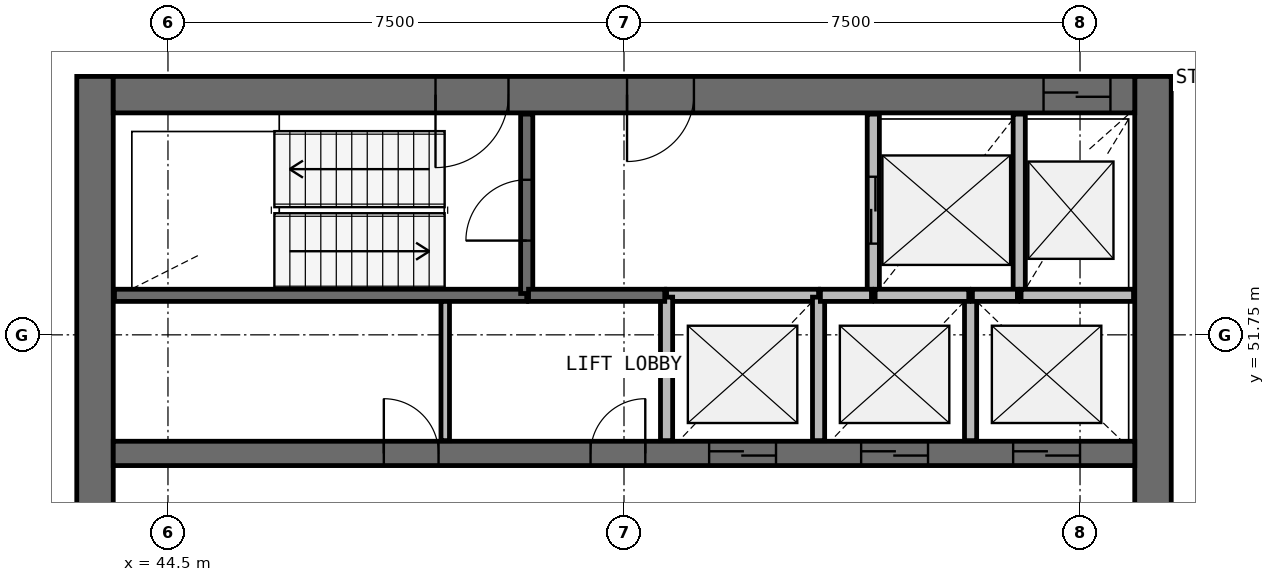
"""IFC4 building model, lengths in metres.
Left out: names, types, materials, properties, quantities, classifications, styles, units other than length and angle.
Written with IfcOpenShell. Run it as: python <this file> out.ifc"""

import sys

from ifc_helpers import new_model, si_unit, direction, frame, frame_2d, origin, place, context, subcontext, project, spatial, rectangle, extrude, source, transform, mapped, element, fill, save


model = new_model("IFC4")
c1 = context("Model", 3, precision=1e-05, world=origin(), true_north=direction((0.0, 1.0)))
c2 = subcontext(c1, "Body", "Model", "MODEL_VIEW")
j1 = project(units=[si_unit("LENGTHUNIT", "METRE"), si_unit("PLANEANGLEUNIT", "RADIAN")], contexts=[c1])
p1 = place(None, origin())
s1 = spatial("IfcSite", under=j1, at=p1, CompositionType="ELEMENT")
p2 = place(p1, origin())
s2 = spatial("IfcBuilding", under=s1, at=p2, CompositionType="ELEMENT")
p3 = place(p2, frame((0.0, 0.0, 187.7)))
s3 = spatial("IfcBuildingStorey", under=s2, at=p3, CompositionType="ELEMENT", Elevation=187.7)
p4 = place(p3, frame((60.7, 40.0, 0.0), z_axis=(0.0, 0.0, 1.0), x_axis=(0.0, 1.0, 0.0)))
e1 = element("IfcWall", 1, at=p4, inside=s3, PredefinedType="SHEAR", context=c2, shape_type="SweptSolid", body=[
    extrude(rectangle(XDim=16.0, YDim=0.6, at=frame_2d((8.0, 0.0))), origin(), (0.0, 0.0, 1.0), 3.9),
])
p5 = place(p4, frame((7.1, 0.0, 0.0)))
e2 = element("IfcOpeningElement", 2, at=p5, cuts=e1, PredefinedType="OPENING", context=c2, shape_type="SweptSolid", body=[
    extrude(rectangle(XDim=1.8, YDim=2.1, at=frame_2d((0.9, 1.05))), frame((0.0, 0.31, 0.0), z_axis=(0.0, -1.0, 0.0), x_axis=(1.0, 0.0, 0.0)), (0.0, 0.0, 1.0), 0.62),
])
p6 = place(p3, frame((43.3, 56.0, 0.0), z_axis=(0.0, 0.0, 1.0), x_axis=(0.0, -1.0, 0.0)))
e3 = element("IfcWall", 3, at=p6, inside=s3, PredefinedType="SHEAR", context=c2, shape_type="SweptSolid", body=[
    extrude(rectangle(XDim=16.0, YDim=0.6, at=frame_2d((8.0, 0.0))), origin(), (0.0, 0.0, 1.0), 3.9),
])
p7 = place(p6, frame((7.1, 0.0, 0.0)))
e4 = element("IfcOpeningElement", 4, at=p7, cuts=e3, PredefinedType="OPENING", context=c2, shape_type="SweptSolid", body=[
    extrude(rectangle(XDim=1.8, YDim=2.1, at=frame_2d((0.9, 1.05))), frame((0.0, 0.31, 0.0), z_axis=(0.0, -1.0, 0.0), x_axis=(1.0, 0.0, 0.0)), (0.0, 0.0, 1.0), 0.62),
])
p8 = place(p3, frame((60.4, 55.7, 0.0), z_axis=(0.0, 0.0, 1.0), x_axis=(-1.0, 0.0, 0.0)))
e5 = element("IfcWall", 5, at=p8, inside=s3, PredefinedType="SHEAR", context=c2, shape_type="SweptSolid", body=[
    extrude(rectangle(XDim=16.8, YDim=0.6, at=frame_2d((8.4, 0.0))), origin(), (0.0, 0.0, 1.0), 3.9),
])
p9 = place(p8, frame((0.4, 0.0, 0.0)))
e6 = element("IfcOpeningElement", 6, at=p9, cuts=e5, PredefinedType="OPENING", context=c2, shape_type="SweptSolid", body=[
    extrude(rectangle(XDim=1.1, YDim=2.1, at=frame_2d((0.55, 1.05))), frame((0.0, 0.31, 0.0), z_axis=(0.0, -1.0, 0.0), x_axis=(1.0, 0.0, 0.0)), (0.0, 0.0, 1.0), 0.62),
])
p10 = place(p8, frame((10.3, 0.0, 0.0)))
e7 = element("IfcOpeningElement", 7, at=p10, cuts=e5, PredefinedType="OPENING", context=c2, shape_type="SweptSolid", body=[
    extrude(rectangle(XDim=1.2, YDim=2.1, at=frame_2d((0.6, 1.05))), frame((0.0, 0.31, 0.0), z_axis=(0.0, -1.0, 0.0), x_axis=(1.0, 0.0, 0.0)), (0.0, 0.0, 1.0), 0.62),
])
p11 = place(p8, frame((7.25, 0.0, 0.0)))
e8 = element("IfcOpeningElement", 8, at=p11, cuts=e5, PredefinedType="OPENING", context=c2, shape_type="SweptSolid", body=[
    extrude(rectangle(XDim=1.1, YDim=2.1, at=frame_2d((0.55, 1.05))), frame((0.0, 0.31, 0.0), z_axis=(0.0, -1.0, 0.0), x_axis=(1.0, 0.0, 0.0)), (0.0, 0.0, 1.0), 0.62),
])
p12 = place(p3, frame((43.6, 49.8, 0.0), z_axis=(0.0, 0.0, 1.0), x_axis=(1.0, 0.0, 0.0)))
e9 = element("IfcWall", 9, at=p12, inside=s3, PredefinedType="SHEAR", context=c2, shape_type="SweptSolid", body=[
    extrude(rectangle(XDim=16.8, YDim=0.4, at=frame_2d((8.4, 0.0))), origin(), (0.0, 0.0, 1.0), 3.9),
])
p13 = place(p12, frame((9.8, 0.0, 0.0)))
e10 = element("IfcOpeningElement", 10, at=p13, cuts=e9, PredefinedType="OPENING", context=c2, shape_type="SweptSolid", body=[
    extrude(rectangle(XDim=1.1, YDim=2.1, at=frame_2d((0.55, 1.05))), frame((0.0, 0.21, 0.0), z_axis=(0.0, -1.0, 0.0), x_axis=(1.0, 0.0, 0.0)), (0.0, 0.0, 1.0), 0.42),
])
p14 = place(p12, frame((12.3, 0.0, 0.0)))
e11 = element("IfcOpeningElement", 11, at=p14, cuts=e9, PredefinedType="OPENING", context=c2, shape_type="SweptSolid", body=[
    extrude(rectangle(XDim=1.1, YDim=2.1, at=frame_2d((0.55, 1.05))), frame((0.0, 0.21, 0.0), z_axis=(0.0, -1.0, 0.0), x_axis=(1.0, 0.0, 0.0)), (0.0, 0.0, 1.0), 0.42),
])
p15 = place(p12, frame((14.8, 0.0, 0.0)))
e12 = element("IfcOpeningElement", 12, at=p15, cuts=e9, PredefinedType="OPENING", context=c2, shape_type="SweptSolid", body=[
    extrude(rectangle(XDim=1.1, YDim=2.1, at=frame_2d((0.55, 1.05))), frame((0.0, 0.21, 0.0), z_axis=(0.0, -1.0, 0.0), x_axis=(1.0, 0.0, 0.0)), (0.0, 0.0, 1.0), 0.42),
])
p16 = place(p12, frame((4.45, 0.0, 0.0)))
e13 = element("IfcOpeningElement", 13, at=p16, cuts=e9, PredefinedType="OPENING", context=c2, shape_type="SweptSolid", body=[
    extrude(rectangle(XDim=0.9, YDim=2.1, at=frame_2d((0.45, 1.05))), frame((0.0, 0.21, 0.0), z_axis=(0.0, -1.0, 0.0), x_axis=(1.0, 0.0, 0.0)), (0.0, 0.0, 1.0), 0.42),
])
p17 = place(p12, frame((7.85, 0.0, 0.0)))
e14 = element("IfcOpeningElement", 14, at=p17, cuts=e9, PredefinedType="OPENING", context=c2, shape_type="SweptSolid", body=[
    extrude(rectangle(XDim=0.9, YDim=2.1, at=frame_2d((0.45, 1.05))), frame((0.0, 0.21, 0.0), z_axis=(0.0, -1.0, 0.0), x_axis=(1.0, 0.0, 0.0)), (0.0, 0.0, 1.0), 0.42),
])
p18 = place(p3, frame((43.62, 52.4, 0.0), z_axis=(0.0, 0.0, 1.0), x_axis=(1.0, 0.0, 0.0)))
e15 = element("IfcWall", 15, at=p18, inside=s3, PredefinedType="SOLIDWALL", context=c2, shape_type="SweptSolid", body=[
    extrude(rectangle(XDim=6.78, YDim=0.2, at=frame_2d((3.39, 0.0))), origin(), (0.0, 0.0, 1.0), 3.58),
])
p19 = place(p3, frame((50.4, 52.43, 0.0), z_axis=(0.0, 0.0, 1.0), x_axis=(0.0, 1.0, 0.0)))
e16 = element("IfcWall", 16, at=p19, inside=s3, PredefinedType="SOLIDWALL", context=c2, shape_type="SweptSolid", body=[
    extrude(rectangle(XDim=2.95, YDim=0.2, at=frame_2d((1.475, 0.0))), origin(), (0.0, 0.0, 1.0), 3.58),
])
p20 = place(p19, frame((0.87, 0.0, 0.0)))
e17 = element("IfcOpeningElement", 17, at=p20, cuts=e16, PredefinedType="OPENING", context=c2, shape_type="SweptSolid", body=[
    extrude(rectangle(XDim=1.0, YDim=2.1, at=frame_2d((0.5, 1.05))), frame((0.0, 0.11, 0.0), z_axis=(0.0, -1.0, 0.0), x_axis=(1.0, 0.0, 0.0)), (0.0, 0.0, 1.0), 0.22),
])
p21 = place(p3, frame((56.1, 55.38, 0.0), z_axis=(0.0, 0.0, 1.0), x_axis=(0.0, -1.0, 0.0)))
e18 = element("IfcWall", 18, at=p21, inside=s3, PredefinedType="SOLIDWALL", context=c2, shape_type="SweptSolid", body=[
    extrude(rectangle(XDim=2.98, YDim=0.2, at=frame_2d((1.49, 0.0))), origin(), (0.0, 0.0, 1.0), 3.58),
])
p22 = place(p21, frame((1.03, 0.0, 0.0)))
e19 = element("IfcOpeningElement", 19, at=p22, cuts=e18, PredefinedType="OPENING", context=c2, shape_type="SweptSolid", body=[
    extrude(rectangle(XDim=1.1, YDim=2.1, at=frame_2d((0.55, 1.05))), frame((0.0, 0.11, 0.0), z_axis=(0.0, -1.0, 0.0), x_axis=(1.0, 0.0, 0.0)), (0.0, 0.0, 1.0), 0.22),
])
p23 = place(p3, frame((58.5, 52.4, 0.0), z_axis=(0.0, 0.0, 1.0), x_axis=(0.0, 1.0, 0.0)))
e20 = element("IfcWall", 20, at=p23, inside=s3, PredefinedType="SOLIDWALL", context=c2, shape_type="SweptSolid", body=[
    extrude(rectangle(XDim=2.98, YDim=0.2, at=frame_2d((1.49, 0.0))), origin(), (0.0, 0.0, 1.0), 3.58),
])
p24 = place(p3, frame((55.2, 52.4, 0.0), z_axis=(0.0, 0.0, 1.0), x_axis=(-1.0, 0.0, 0.0)))
e21 = element("IfcWall", 21, at=p24, inside=s3, PredefinedType="SOLIDWALL", context=c2, shape_type="SweptSolid", body=[
    extrude(rectangle(XDim=2.5, YDim=0.2, at=frame_2d((1.25, 0.0))), origin(), (0.0, 0.0, 1.0), 3.58),
])
for number, where, z_axis, x_axis in (
    (22, (52.7, 52.37, 0.0), (0.0, 0.0, 1.0), (0.0, -1.0, 0.0)),
    (23, (55.2, 50.01, 0.0), (0.0, 0.0, 1.0), (0.0, 1.0, 0.0)),
):
    element("IfcWall", number, at=place(p3, frame(where, z_axis=z_axis, x_axis=x_axis)), inside=s3, PredefinedType="SOLIDWALL", context=c2, shape_type="SweptSolid", body=[
        extrude(rectangle(XDim=2.36, YDim=0.2, at=frame_2d((1.18, 0.0))), origin(), (0.0, 0.0, 1.0), 3.58),
    ])
p25 = place(p3, frame((57.7, 50.01, 0.0), z_axis=(0.0, 0.0, 1.0), x_axis=(0.0, 1.0, 0.0)))
e24 = element("IfcWall", 24, at=p25, inside=s3, PredefinedType="SOLIDWALL", context=c2, shape_type="SweptSolid", body=[
    extrude(rectangle(XDim=2.39, YDim=0.2, at=frame_2d((1.195, 0.0))), origin(), (0.0, 0.0, 1.0), 3.58),
])
p26 = place(p3, frame((50.43, 52.4, 0.0), z_axis=(0.0, 0.0, 1.0), x_axis=(1.0, 0.0, 0.0)))
e25 = element("IfcWall", 25, at=p26, inside=s3, PredefinedType="SOLIDWALL", context=c2, shape_type="SweptSolid", body=[
    extrude(rectangle(XDim=2.24, YDim=0.2, at=frame_2d((1.12, 0.0))), origin(), (0.0, 0.0, 1.0), 3.58),
])
p27 = place(p3, frame((60.38, 52.4, 0.0), z_axis=(0.0, 0.0, 1.0), x_axis=(-1.0, 0.0, 0.0)))
e26 = element("IfcWall", 26, at=p27, inside=s3, PredefinedType="SOLIDWALL", context=c2, shape_type="SweptSolid", body=[
    extrude(rectangle(XDim=1.85, YDim=0.2, at=frame_2d((0.925, 0.0))), origin(), (0.0, 0.0, 1.0), 3.58),
])
p28 = place(p3, frame((57.67, 52.4, 0.0), z_axis=(0.0, 0.0, 1.0), x_axis=(-1.0, 0.0, 0.0)))
e27 = element("IfcWall", 27, at=p28, inside=s3, PredefinedType="SOLIDWALL", context=c2, shape_type="SweptSolid", body=[
    extrude(rectangle(XDim=1.54, YDim=0.2, at=frame_2d((0.77, 0.0))), origin(), (0.0, 0.0, 1.0), 3.58),
])
p29 = place(p3, frame((56.07, 52.4, 0.0), z_axis=(0.0, 0.0, 1.0), x_axis=(-1.0, 0.0, 0.0)))
e28 = element("IfcWall", 28, at=p29, inside=s3, PredefinedType="SOLIDWALL", context=c2, shape_type="SweptSolid", body=[
    extrude(rectangle(XDim=0.84, YDim=0.2, at=frame_2d((0.42, 0.0))), origin(), (0.0, 0.0, 1.0), 3.58),
])
p30 = place(p3, frame((58.47, 52.4, 0.0), z_axis=(0.0, 0.0, 1.0), x_axis=(-1.0, 0.0, 0.0)))
e29 = element("IfcWall", 29, at=p30, inside=s3, PredefinedType="SOLIDWALL", context=c2, shape_type="SweptSolid", body=[
    extrude(rectangle(XDim=0.74, YDim=0.2, at=frame_2d((0.37, 0.0))), origin(), (0.0, 0.0, 1.0), 3.58),
])
p31 = place(p3, frame((49.06, 50.01, 0.0), z_axis=(0.0, 0.0, 1.0), x_axis=(0.0, 1.0, 0.0)))
e30 = element("IfcWall", 30, at=p31, inside=s3, PredefinedType="PARTITIONING", context=c2, shape_type="SweptSolid", body=[
    extrude(rectangle(XDim=2.29, YDim=0.14, at=frame_2d((1.145, 0.0))), origin(), (0.0, 0.0, 1.0), 2.88),
])
m1 = source(origin(), c2, "Body", "SweptSolid", [
    extrude(rectangle(XDim=1.1, YDim=2.1, at=frame_2d((0.55, 1.05))), frame((0.0, 0.025, 0.0), z_axis=(0.0, -1.0, 0.0), x_axis=(1.0, 0.0, 0.0)), (0.0, 0.0, 1.0), 0.05),
])
p32 = place(p13, origin())
e31 = element("IfcDoor", 31, at=p32, inside=s3, OperationType="DOUBLE_DOOR_SLIDING", PredefinedType="USERDEFINED", context=c2, shape_type="MappedRepresentation", body=[
    mapped(m1, transform((0.0, 0.0, 0.0), scale=1.0)),
])
fill(e10, e31)
p33 = place(p14, origin())
e32 = element("IfcDoor", 32, at=p33, inside=s3, OperationType="DOUBLE_DOOR_SLIDING", PredefinedType="USERDEFINED", context=c2, shape_type="MappedRepresentation", body=[
    mapped(m1, transform((0.0, 0.0, 0.0), scale=1.0)),
])
fill(e11, e32)
p34 = place(p15, origin())
e33 = element("IfcDoor", 33, at=p34, inside=s3, OperationType="DOUBLE_DOOR_SLIDING", PredefinedType="USERDEFINED", context=c2, shape_type="MappedRepresentation", body=[
    mapped(m1, transform((0.0, 0.0, 0.0), scale=1.0)),
])
fill(e12, e33)
p35 = place(p22, origin())
e34 = element("IfcDoor", 34, at=p35, inside=s3, OperationType="DOUBLE_DOOR_SLIDING", PredefinedType="USERDEFINED", context=c2, shape_type="MappedRepresentation", body=[
    mapped(m1, transform((0.0, 0.0, 0.0), scale=1.0)),
])
fill(e19, e34)
p36 = place(p9, origin())
e35 = element("IfcDoor", 35, at=p36, inside=s3, OperationType="DOUBLE_DOOR_SLIDING", PredefinedType="USERDEFINED", context=c2, shape_type="MappedRepresentation", body=[
    mapped(m1, transform((0.0, 0.0, 0.0), scale=1.0)),
])
fill(e6, e35)
m2 = source(origin(), c2, "Body", "SweptSolid", [
    extrude(rectangle(XDim=1.2, YDim=2.1, at=frame_2d((0.6, 1.05))), frame((0.0, 0.025, 0.0), z_axis=(0.0, -1.0, 0.0), x_axis=(1.0, 0.0, 0.0)), (0.0, 0.0, 1.0), 0.05),
])
p37 = place(p10, origin())
e36 = element("IfcDoor", 36, at=p37, inside=s3, OperationType="SINGLE_SWING_RIGHT", PredefinedType="DOOR", context=c2, shape_type="MappedRepresentation", body=[
    mapped(m2, transform((0.0, 0.0, 0.0), scale=1.0)),
])
fill(e7, e36)
m3 = source(origin(), c2, "Body", "SweptSolid", [
    extrude(rectangle(XDim=1.0, YDim=2.1, at=frame_2d((0.5, 1.05))), frame((0.0, 0.025, 0.0), z_axis=(0.0, -1.0, 0.0), x_axis=(1.0, 0.0, 0.0)), (0.0, 0.0, 1.0), 0.05),
])
p38 = place(p20, origin())
e37 = element("IfcDoor", 37, at=p38, inside=s3, OperationType="SINGLE_SWING_LEFT", PredefinedType="DOOR", context=c2, shape_type="MappedRepresentation", body=[
    mapped(m3, transform((0.0, 0.0, 0.0), scale=1.0)),
])
fill(e17, e37)
m4 = source(origin(), c2, "Body", "SweptSolid", [
    extrude(rectangle(XDim=1.1, YDim=2.1, at=frame_2d((0.55, 1.05))), frame((0.0, 0.025, 0.0), z_axis=(0.0, -1.0, 0.0), x_axis=(1.0, 0.0, 0.0)), (0.0, 0.0, 1.0), 0.05),
])
p39 = place(p11, origin())
e38 = element("IfcDoor", 38, at=p39, inside=s3, OperationType="SINGLE_SWING_RIGHT", PredefinedType="DOOR", context=c2, shape_type="MappedRepresentation", body=[
    mapped(m4, transform((0.0, 0.0, 0.0), scale=1.0)),
])
fill(e8, e38)
m5 = source(origin(), c2, "Body", "SweptSolid", [
    extrude(rectangle(XDim=0.9, YDim=2.1, at=frame_2d((0.45, 1.05))), frame((0.0, 0.025, 0.0), z_axis=(0.0, -1.0, 0.0), x_axis=(1.0, 0.0, 0.0)), (0.0, 0.0, 1.0), 0.05),
])
p40 = place(p16, origin())
e39 = element("IfcDoor", 39, at=p40, inside=s3, OperationType="SINGLE_SWING_LEFT", PredefinedType="DOOR", context=c2, shape_type="MappedRepresentation", body=[
    mapped(m5, transform((0.0, 0.0, 0.0), scale=1.0)),
])
fill(e13, e39)
p41 = place(p17, origin())
e40 = element("IfcDoor", 40, at=p41, inside=s3, OperationType="SINGLE_SWING_RIGHT", PredefinedType="DOOR", context=c2, shape_type="MappedRepresentation", body=[
    mapped(m5, transform((0.0, 0.0, 0.0), scale=1.0)),
])
fill(e14, e40)
save(model, sys.argv[1])
